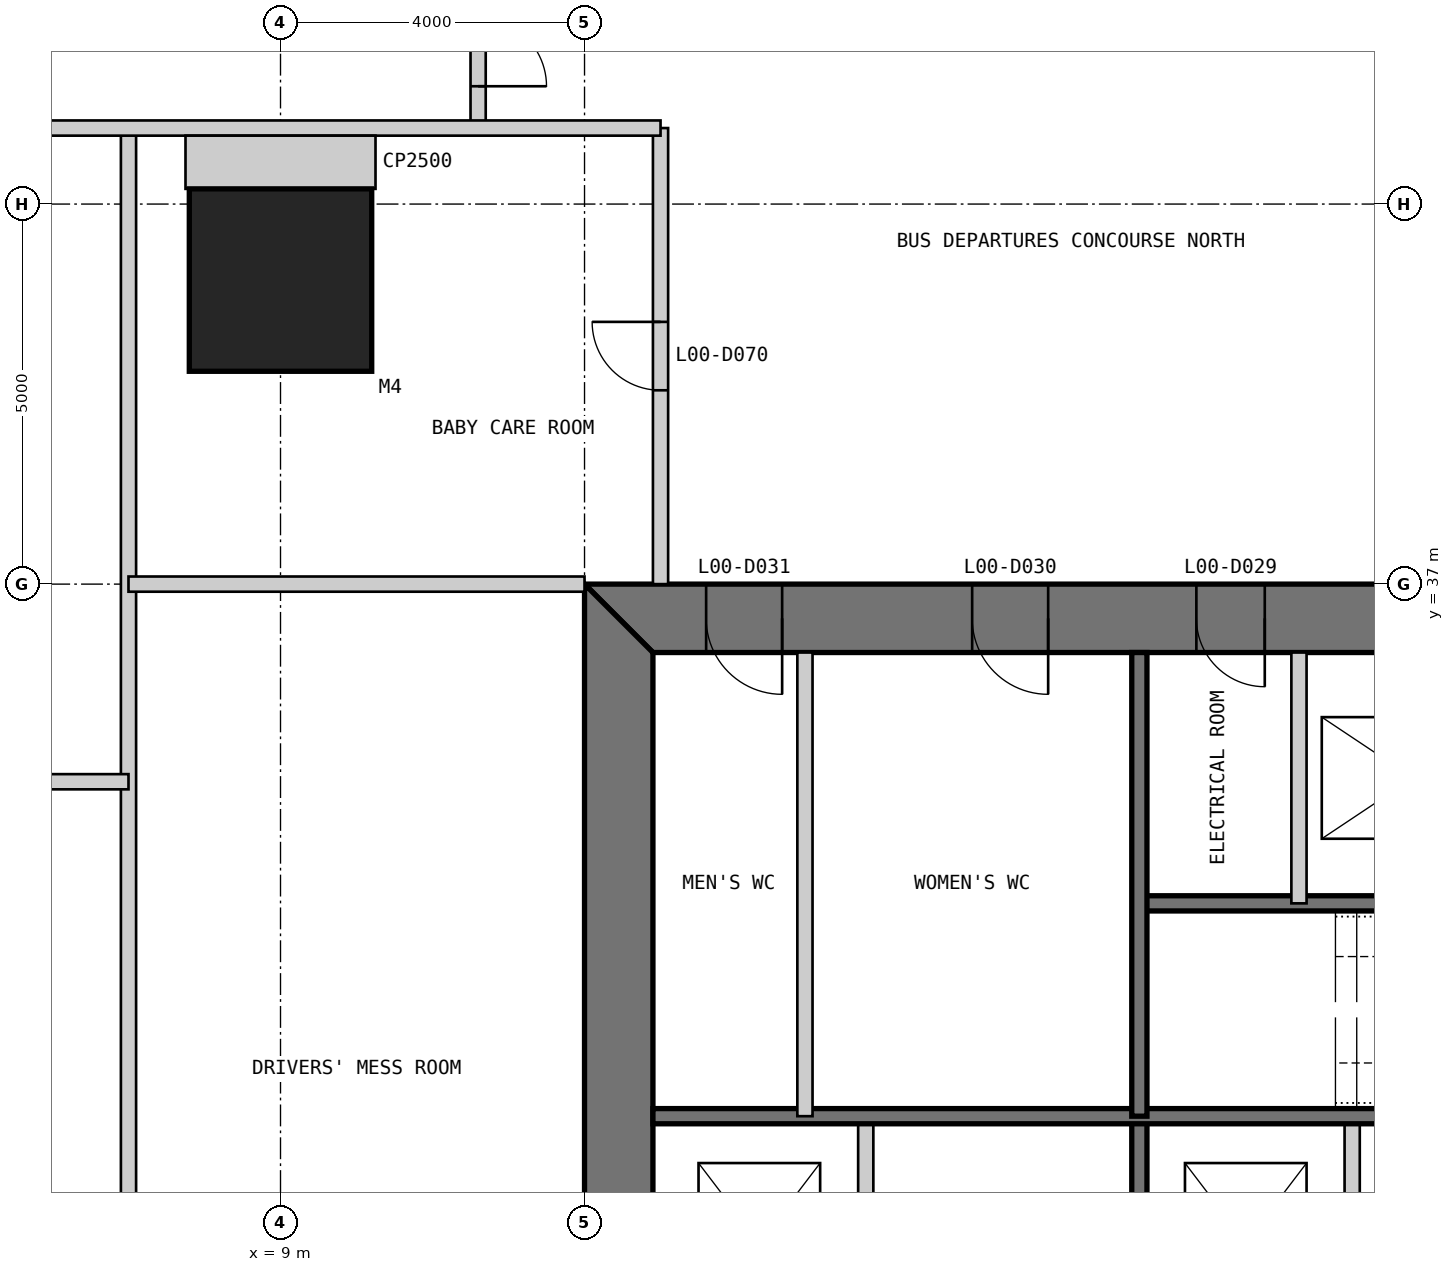
"""IFC4 building model, lengths in metres.
Left out: names, types, materials, properties, quantities, classifications, styles, units other than length and angle.
Written with IfcOpenShell. Run it as: python <this file> out.ifc"""

import sys

from ifc_helpers import new_model, si_unit, direction, frame, frame_2d, origin, origin_2d, place, context, subcontext, project, spatial, polyline, rectangle, outline, extrude, element, fill, save


model = new_model("IFC4")
c1 = context("Model", 3, precision=1e-05, world=origin(), true_north=direction((0.0, 1.0)))
c2 = subcontext(c1, "Body", "Model", "MODEL_VIEW")
j1 = project(units=[si_unit("LENGTHUNIT", "METRE"), si_unit("PLANEANGLEUNIT", "RADIAN")], contexts=[c1])
p1 = place(None, origin())
s1 = spatial("IfcSite", under=j1, at=p1, CompositionType="ELEMENT")
p2 = place(p1, origin())
s2 = spatial("IfcBuilding", under=s1, at=p2, CompositionType="ELEMENT")
p3 = place(p2, origin())
s3 = spatial("IfcBuildingStorey", under=s2, at=p3, CompositionType="ELEMENT", Elevation=0.0)
p4 = place(p3, frame((9.0, 41.0, 0.0), z_axis=(0.0, 0.0, 1.0), x_axis=(1.0, 0.0, 0.0)))
e1 = element("IfcColumn", 1, at=p4, inside=s3, PredefinedType="COLUMN", context=c2, shape_type="SweptSolid", body=[
    extrude(rectangle(XDim=2.4, YDim=2.4, at=origin_2d()), origin(), (0.0, 0.0, 1.0), 7.0),
])
p5 = place(p3, frame((37.0, 36.55, 0.0), z_axis=(0.0, 0.0, 1.0), x_axis=(-1.0, 0.0, 0.0)))
e2 = element("IfcWall", 2, at=p5, inside=s3, PredefinedType="SHEAR", context=c2, shape_type="SweptSolid", body=[
    extrude(outline(polyline([(0.0, -0.45), (24.0, -0.45), (23.1, 0.45), (0.9, 0.45), (0.0, -0.45)])), origin(), (0.0, 0.0, 1.0), 7.0),
])
p6 = place(p5, frame((4.9, 0.0, 0.0)))
e3 = element("IfcOpeningElement", 3, at=p6, cuts=e2, PredefinedType="OPENING", context=c2, shape_type="SweptSolid", body=[
    extrude(rectangle(XDim=1.0, YDim=2.2, at=frame_2d((0.5, 1.1))), frame((0.0, 0.46, 0.0), z_axis=(0.0, -1.0, 0.0), x_axis=(1.0, 0.0, 0.0)), (0.0, 0.0, 1.0), 0.92),
])
p7 = place(p5, frame((8.9, 0.0, 0.0)))
e4 = element("IfcOpeningElement", 4, at=p7, cuts=e2, PredefinedType="OPENING", context=c2, shape_type="SweptSolid", body=[
    extrude(rectangle(XDim=1.1, YDim=2.2, at=frame_2d((0.55, 1.1))), frame((0.0, 0.46, 0.0), z_axis=(0.0, -1.0, 0.0), x_axis=(1.0, 0.0, 0.0)), (0.0, 0.0, 1.0), 0.92),
])
p8 = place(p5, frame((15.05, 0.0, 0.0)))
e5 = element("IfcOpeningElement", 5, at=p8, cuts=e2, PredefinedType="OPENING", context=c2, shape_type="SweptSolid", body=[
    extrude(rectangle(XDim=0.9, YDim=2.2, at=frame_2d((0.45, 1.1))), frame((0.0, 0.46, 0.0), z_axis=(0.0, -1.0, 0.0), x_axis=(1.0, 0.0, 0.0)), (0.0, 0.0, 1.0), 0.92),
])
p9 = place(p5, frame((17.9, 0.0, 0.0)))
e6 = element("IfcOpeningElement", 6, at=p9, cuts=e2, PredefinedType="OPENING", context=c2, shape_type="SweptSolid", body=[
    extrude(rectangle(XDim=1.0, YDim=2.2, at=frame_2d((0.5, 1.1))), frame((0.0, 0.46, 0.0), z_axis=(0.0, -1.0, 0.0), x_axis=(1.0, 0.0, 0.0)), (0.0, 0.0, 1.0), 0.92),
])
p10 = place(p5, frame((21.4, 0.0, 0.0)))
e7 = element("IfcOpeningElement", 7, at=p10, cuts=e2, PredefinedType="OPENING", context=c2, shape_type="SweptSolid", body=[
    extrude(rectangle(XDim=1.0, YDim=2.2, at=frame_2d((0.5, 1.1))), frame((0.0, 0.46, 0.0), z_axis=(0.0, -1.0, 0.0), x_axis=(1.0, 0.0, 0.0)), (0.0, 0.0, 1.0), 0.92),
])
p11 = place(p3, frame((13.45, 36.1, 0.0), z_axis=(0.0, 0.0, 1.0), x_axis=(0.0, -1.0, 0.0)))
e8 = element("IfcWall", 8, at=p11, inside=s3, PredefinedType="SHEAR", context=c2, shape_type="SweptSolid", body=[
    extrude(outline(polyline([(-0.9, -0.45), (23.1, -0.45), (22.2, 0.45), (0.0, 0.45), (-0.9, -0.45)])), origin(), (0.0, 0.0, 1.0), 7.0),
])
p12 = place(p11, frame((20.2, 0.0, 0.0)))
e9 = element("IfcOpeningElement", 9, at=p12, cuts=e8, PredefinedType="OPENING", context=c2, shape_type="SweptSolid", body=[
    extrude(rectangle(XDim=1.0, YDim=2.2, at=frame_2d((0.5, 1.1))), frame((0.0, 0.46, 0.0), z_axis=(0.0, -1.0, 0.0), x_axis=(1.0, 0.0, 0.0)), (0.0, 0.0, 1.0), 0.92),
])
p13 = place(p11, frame((17.25, 0.0, 0.0)))
e10 = element("IfcOpeningElement", 10, at=p13, cuts=e8, PredefinedType="OPENING", context=c2, shape_type="SweptSolid", body=[
    extrude(rectangle(XDim=0.9, YDim=2.2, at=frame_2d((0.45, 1.1))), frame((0.0, 0.46, 0.0), z_axis=(0.0, -1.0, 0.0), x_axis=(1.0, 0.0, 0.0)), (0.0, 0.0, 1.0), 0.92),
])
p14 = place(p3, frame((16.7, 13.9, 0.0), z_axis=(0.0, 0.0, 1.0), x_axis=(0.0, 1.0, 0.0)))
e11 = element("IfcWall", 11, at=p14, inside=s3, PredefinedType="PARTITIONING", context=c2, shape_type="SweptSolid", body=[
    extrude(rectangle(XDim=16.1, YDim=0.2, at=frame_2d((8.05, 0.0))), origin(), (0.0, 0.0, 1.0), 6.8),
])
p15 = place(p14, frame((3.8, 0.0, 0.0)))
e12 = element("IfcOpeningElement", 12, at=p15, cuts=e11, PredefinedType="OPENING", context=c2, shape_type="SweptSolid", body=[
    extrude(rectangle(XDim=0.9, YDim=2.2, at=frame_2d((0.45, 1.1))), frame((0.0, 0.11, 0.0), z_axis=(0.0, -1.0, 0.0), x_axis=(1.0, 0.0, 0.0)), (0.0, 0.0, 1.0), 0.22),
])
p16 = place(p14, frame((7.217, 0.0, 0.0)))
e13 = element("IfcOpeningElement", 13, at=p16, cuts=e11, PredefinedType="OPENING", context=c2, shape_type="SweptSolid", body=[
    extrude(rectangle(XDim=1.1, YDim=2.2, at=frame_2d((0.55, 1.1))), frame((0.0, 0.11, 0.0), z_axis=(0.0, -1.0, 0.0), x_axis=(1.0, 0.0, 0.0)), (0.0, 0.0, 1.0), 0.22),
])
p17 = place(p14, frame((10.55, 0.0, 0.0)))
e14 = element("IfcOpeningElement", 14, at=p17, cuts=e11, PredefinedType="OPENING", context=c2, shape_type="SweptSolid", body=[
    extrude(rectangle(XDim=1.1, YDim=2.2, at=frame_2d((0.55, 1.1))), frame((0.0, 0.11, 0.0), z_axis=(0.0, -1.0, 0.0), x_axis=(1.0, 0.0, 0.0)), (0.0, 0.0, 1.0), 0.22),
])
p18 = place(p14, frame((13.883, 0.0, 0.0)))
e15 = element("IfcOpeningElement", 15, at=p18, cuts=e11, PredefinedType="OPENING", context=c2, shape_type="SweptSolid", body=[
    extrude(rectangle(XDim=1.1, YDim=2.2, at=frame_2d((0.55, 1.1))), frame((0.0, 0.11, 0.0), z_axis=(0.0, -1.0, 0.0), x_axis=(1.0, 0.0, 0.0)), (0.0, 0.0, 1.0), 0.22),
])
p19 = place(p3, frame((20.3, 13.9, 0.0), z_axis=(0.0, 0.0, 1.0), x_axis=(0.0, 1.0, 0.0)))
e16 = element("IfcWall", 16, at=p19, inside=s3, PredefinedType="SOLIDWALL", context=c2, shape_type="SweptSolid", body=[
    extrude(rectangle(XDim=16.1, YDim=0.2, at=frame_2d((8.05, 0.0))), origin(), (0.0, 0.0, 1.0), 6.8),
])
p20 = place(p19, frame((7.217, 0.0, 0.0)))
e17 = element("IfcOpeningElement", 17, at=p20, cuts=e16, PredefinedType="OPENING", context=c2, shape_type="SweptSolid", body=[
    extrude(rectangle(XDim=1.1, YDim=2.2, at=frame_2d((0.55, 1.1))), frame((0.0, 0.11, 0.0), z_axis=(0.0, -1.0, 0.0), x_axis=(1.0, 0.0, 0.0)), (0.0, 0.0, 1.0), 0.22),
])
p21 = place(p19, frame((10.55, 0.0, 0.0)))
e18 = element("IfcOpeningElement", 18, at=p21, cuts=e16, PredefinedType="OPENING", context=c2, shape_type="SweptSolid", body=[
    extrude(rectangle(XDim=1.1, YDim=2.2, at=frame_2d((0.55, 1.1))), frame((0.0, 0.11, 0.0), z_axis=(0.0, -1.0, 0.0), x_axis=(1.0, 0.0, 0.0)), (0.0, 0.0, 1.0), 0.22),
])
p22 = place(p19, frame((13.883, 0.0, 0.0)))
e19 = element("IfcOpeningElement", 19, at=p22, cuts=e16, PredefinedType="OPENING", context=c2, shape_type="SweptSolid", body=[
    extrude(rectangle(XDim=1.1, YDim=2.2, at=frame_2d((0.55, 1.1))), frame((0.0, 0.11, 0.0), z_axis=(0.0, -1.0, 0.0), x_axis=(1.0, 0.0, 0.0)), (0.0, 0.0, 1.0), 0.22),
])
p23 = place(p3, frame((23.1, 20.0, 0.0), z_axis=(0.0, 0.0, 1.0), x_axis=(0.0, 1.0, 0.0)))
e20 = element("IfcWall", 20, at=p23, inside=s3, PredefinedType="PARTITIONING", context=c2, shape_type="SweptSolid", body=[
    extrude(rectangle(XDim=10.0, YDim=0.2, at=frame_2d((5.0, 0.0))), origin(), (0.0, 0.0, 1.0), 6.8),
])
p24 = place(p3, frame((29.7, 32.8, 0.0), z_axis=(0.0, 0.0, 1.0), x_axis=(-1.0, 0.0, 0.0)))
e21 = element("IfcWall", 21, at=p24, inside=s3, PredefinedType="SOLIDWALL", context=c2, shape_type="SweptSolid", body=[
    extrude(rectangle(XDim=9.4, YDim=0.2, at=frame_2d((4.7, 0.0))), origin(), (0.0, 0.0, 1.0), 6.8),
])
p25 = place(p24, frame((0.25, 0.0, 0.0)))
e22 = element("IfcOpeningElement", 22, at=p25, cuts=e21, PredefinedType="OPENING", context=c2, shape_type="SweptSolid", body=[
    extrude(rectangle(XDim=1.0, YDim=2.2, at=frame_2d((0.5, 1.1))), frame((0.0, 0.11, 0.0), z_axis=(0.0, -1.0, 0.0), x_axis=(1.0, 0.0, 0.0)), (0.0, 0.0, 1.0), 0.22),
])
p26 = place(p3, frame((29.7, 30.0, 0.0), z_axis=(0.0, 0.0, 1.0), x_axis=(-1.0, 0.0, 0.0)))
e23 = element("IfcWall", 23, at=p26, inside=s3, PredefinedType="SOLIDWALL", context=c2, shape_type="SweptSolid", body=[
    extrude(rectangle(XDim=15.8, YDim=0.2, at=frame_2d((7.9, 0.0))), origin(), (0.0, 0.0, 1.0), 6.8),
])
p27 = place(p3, frame((22.4, 36.1, 0.0), z_axis=(0.0, 0.0, 1.0), x_axis=(0.0, -1.0, 0.0)))
e24 = element("IfcWall", 24, at=p27, inside=s3, PredefinedType="PARTITIONING", context=c2, shape_type="SweptSolid", body=[
    extrude(rectangle(XDim=3.3, YDim=0.2, at=frame_2d((1.65, 0.0))), origin(), (0.0, 0.0, 1.0), 6.8),
])
p28 = place(p3, frame((20.3, 36.1, 0.0), z_axis=(0.0, 0.0, 1.0), x_axis=(0.0, -1.0, 0.0)))
e25 = element("IfcWall", 25, at=p28, inside=s3, PredefinedType="SOLIDWALL", context=c2, shape_type="SweptSolid", body=[
    extrude(rectangle(XDim=6.1, YDim=0.2, at=frame_2d((3.05, 0.0))), origin(), (0.0, 0.0, 1.0), 6.8),
])
p29 = place(p3, frame((15.9, 36.1, 0.0), z_axis=(0.0, 0.0, 1.0), x_axis=(0.0, -1.0, 0.0)))
e26 = element("IfcWall", 26, at=p29, inside=s3, PredefinedType="PARTITIONING", context=c2, shape_type="SweptSolid", body=[
    extrude(rectangle(XDim=6.1, YDim=0.2, at=frame_2d((3.05, 0.0))), origin(), (0.0, 0.0, 1.0), 6.8),
])
p30 = place(p3, frame((7.0, 22.0, 0.0), z_axis=(0.0, 0.0, 1.0), x_axis=(0.0, 1.0, 0.0)))
e27 = element("IfcWall", 27, at=p30, inside=s3, PredefinedType="PARTITIONING", context=c2, shape_type="SweptSolid", body=[
    extrude(rectangle(XDim=21.0, YDim=0.2, at=frame_2d((10.5, 0.0))), origin(), (0.0, 0.0, 1.0), 6.043),
])
p31 = place(p30, frame((4.05, 0.0, 0.0)))
e28 = element("IfcOpeningElement", 28, at=p31, cuts=e27, PredefinedType="OPENING", context=c2, shape_type="SweptSolid", body=[
    extrude(rectangle(XDim=1.8, YDim=2.4, at=frame_2d((0.9, 1.2))), frame((0.0, 0.11, 0.0), z_axis=(0.0, -1.0, 0.0), x_axis=(1.0, 0.0, 0.0)), (0.0, 0.0, 1.0), 0.22),
])
p32 = place(p3, frame((11.6, 43.0, 0.0), z_axis=(0.0, 0.0, 1.0), x_axis=(0.0, 1.0, 0.0)))
e29 = element("IfcWall", 29, at=p32, inside=s3, PredefinedType="PARTITIONING", context=c2, shape_type="SweptSolid", body=[
    extrude(rectangle(XDim=22.25, YDim=0.2, at=frame_2d((11.125, 0.0))), origin(), (0.0, 0.0, 1.0), 6.7),
])
p33 = place(p32, frame((7.175, 0.0, 0.0)))
e30 = element("IfcOpeningElement", 30, at=p33, cuts=e29, PredefinedType="OPENING", context=c2, shape_type="SweptSolid", body=[
    extrude(rectangle(XDim=1.8, YDim=2.4, at=frame_2d((0.9, 1.2))), frame((0.0, 0.11, 0.0), z_axis=(0.0, -1.0, 0.0), x_axis=(1.0, 0.0, 0.0)), (0.0, 0.0, 1.0), 0.22),
])
p34 = place(p32, frame((0.55, 0.0, 0.0)))
e31 = element("IfcOpeningElement", 31, at=p34, cuts=e29, PredefinedType="OPENING", context=c2, shape_type="SweptSolid", body=[
    extrude(rectangle(XDim=1.8, YDim=2.4, at=frame_2d((0.9, 1.2))), frame((0.0, 0.11, 0.0), z_axis=(0.0, -1.0, 0.0), x_axis=(1.0, 0.0, 0.0)), (0.0, 0.0, 1.0), 0.22),
])
p35 = place(p32, frame((17.5, 0.0, 0.0)))
e32 = element("IfcOpeningElement", 32, at=p35, cuts=e29, PredefinedType="OPENING", context=c2, shape_type="SweptSolid", body=[
    extrude(rectangle(XDim=1.8, YDim=2.4, at=frame_2d((0.9, 1.2))), frame((0.0, 0.11, 0.0), z_axis=(0.0, -1.0, 0.0), x_axis=(1.0, 0.0, 0.0)), (0.0, 0.0, 1.0), 0.22),
])
p36 = place(p3, frame((14.0, 37.0, 0.0), z_axis=(0.0, 0.0, 1.0), x_axis=(0.0, 1.0, 0.0)))
e33 = element("IfcWall", 33, at=p36, inside=s3, PredefinedType="PARTITIONING", context=c2, shape_type="SweptSolid", body=[
    extrude(rectangle(XDim=6.0, YDim=0.2, at=frame_2d((3.0, 0.0))), origin(), (0.0, 0.0, 1.0), 6.7),
])
p37 = place(p36, frame((2.55, 0.0, 0.0)))
e34 = element("IfcOpeningElement", 34, at=p37, cuts=e33, PredefinedType="OPENING", context=c2, shape_type="SweptSolid", body=[
    extrude(rectangle(XDim=0.9, YDim=2.2, at=frame_2d((0.45, 1.1))), frame((0.0, 0.11, 0.0), z_axis=(0.0, -1.0, 0.0), x_axis=(1.0, 0.0, 0.0)), (0.0, 0.0, 1.0), 0.22),
])
p38 = place(p3, frame((-15.25, 34.4, 0.0), z_axis=(0.0, 0.0, 1.0), x_axis=(1.0, 0.0, 0.0)))
e35 = element("IfcWall", 35, at=p38, inside=s3, PredefinedType="PARTITIONING", context=c2, shape_type="SweptSolid", body=[
    extrude(rectangle(XDim=22.25, YDim=0.2, at=frame_2d((11.125, 0.0))), origin(), (0.0, 0.0, 1.0), 6.7),
])
p39 = place(p38, frame((17.525, 0.0, 0.0)))
e36 = element("IfcOpeningElement", 36, at=p39, cuts=e35, PredefinedType="OPENING", context=c2, shape_type="SweptSolid", body=[
    extrude(rectangle(XDim=1.8, YDim=2.4, at=frame_2d((0.9, 1.2))), frame((0.0, 0.11, 0.0), z_axis=(0.0, -1.0, 0.0), x_axis=(1.0, 0.0, 0.0)), (0.0, 0.0, 1.0), 0.22),
])
p40 = place(p38, frame((10.325, 0.0, 0.0)))
e37 = element("IfcOpeningElement", 37, at=p40, cuts=e35, PredefinedType="OPENING", context=c2, shape_type="SweptSolid", body=[
    extrude(rectangle(XDim=1.8, YDim=2.4, at=frame_2d((0.9, 1.2))), frame((0.0, 0.11, 0.0), z_axis=(0.0, -1.0, 0.0), x_axis=(1.0, 0.0, 0.0)), (0.0, 0.0, 1.0), 0.22),
])
p41 = place(p38, frame((3.025, 0.0, 0.0)))
e38 = element("IfcOpeningElement", 38, at=p41, cuts=e35, PredefinedType="OPENING", context=c2, shape_type="SweptSolid", body=[
    extrude(rectangle(XDim=1.8, YDim=2.4, at=frame_2d((0.9, 1.2))), frame((0.0, 0.11, 0.0), z_axis=(0.0, -1.0, 0.0), x_axis=(1.0, 0.0, 0.0)), (0.0, 0.0, 1.0), 0.22),
])
p42 = place(p3, frame((7.0, 37.0, 0.0), z_axis=(0.0, 0.0, 1.0), x_axis=(1.0, 0.0, 0.0)))
e39 = element("IfcWall", 39, at=p42, inside=s3, PredefinedType="PARTITIONING", context=c2, shape_type="SweptSolid", body=[
    extrude(rectangle(XDim=6.0, YDim=0.2, at=frame_2d((3.0, 0.0))), origin(), (0.0, 0.0, 1.0), 5.853),
])
p43 = place(p3, frame((-0.6, 43.0, 0.0), z_axis=(0.0, 0.0, 1.0), x_axis=(1.0, 0.0, 0.0)))
e40 = element("IfcWall", 40, at=p43, inside=s3, PredefinedType="PARTITIONING", context=c2, shape_type="SweptSolid", body=[
    extrude(rectangle(XDim=14.6, YDim=0.2, at=frame_2d((7.3, 0.0))), origin(), (0.0, 0.0, 1.0), 6.7),
])
p44 = place(p3, frame((9.0, 42.9, 0.0), z_axis=(0.0, 0.0, 1.0), x_axis=(0.0, -1.0, 0.0)))
e41 = element("IfcWall", 41, at=p44, inside=s3, PredefinedType="PARTITIONING", context=c2, shape_type="SweptSolid", body=[
    extrude(rectangle(XDim=0.7, YDim=2.5, at=frame_2d((0.35, 0.0))), origin(), (0.0, 0.0, 1.0), 6.7),
])
p45 = place(p8, origin())
e42 = element("IfcDoor", 42, at=p45, inside=s3, OperationType="SINGLE_SWING_LEFT", PredefinedType="DOOR", context=c2, shape_type="SweptSolid", body=[
    extrude(rectangle(XDim=0.9, YDim=2.2, at=frame_2d((0.45, 1.1))), frame((0.0, 0.025, 0.0), z_axis=(0.0, -1.0, 0.0), x_axis=(1.0, 0.0, 0.0)), (0.0, 0.0, 1.0), 0.05),
    extrude(outline(polyline([(0.0, 0.0), (0.04, 0.0), (0.04, 2.16), (0.86, 2.16), (0.86, 0.0), (0.9, 0.0), (0.9, 2.2), (0.0, 2.2), (0.0, 0.0)])), frame((0.0, 0.3, 0.0), z_axis=(0.0, -1.0, 0.0), x_axis=(1.0, 0.0, 0.0)), (0.0, 0.0, 1.0), 0.6),
])
fill(e5, e42)
p46 = place(p9, origin())
e43 = element("IfcDoor", 43, at=p46, inside=s3, OperationType="SINGLE_SWING_LEFT", PredefinedType="DOOR", context=c2, shape_type="SweptSolid", body=[
    extrude(rectangle(XDim=1.0, YDim=2.2, at=frame_2d((0.5, 1.1))), frame((0.0, 0.025, 0.0), z_axis=(0.0, -1.0, 0.0), x_axis=(1.0, 0.0, 0.0)), (0.0, 0.0, 1.0), 0.05),
    extrude(outline(polyline([(0.0, 0.0), (0.04, 0.0), (0.04, 2.16), (0.96, 2.16), (0.96, 0.0), (1.0, 0.0), (1.0, 2.2), (0.0, 2.2), (0.0, 0.0)])), frame((0.0, 0.3, 0.0), z_axis=(0.0, -1.0, 0.0), x_axis=(1.0, 0.0, 0.0)), (0.0, 0.0, 1.0), 0.6),
])
fill(e6, e43)
p47 = place(p10, origin())
e44 = element("IfcDoor", 44, at=p47, inside=s3, OperationType="SINGLE_SWING_LEFT", PredefinedType="DOOR", context=c2, shape_type="SweptSolid", body=[
    extrude(rectangle(XDim=1.0, YDim=2.2, at=frame_2d((0.5, 1.1))), frame((0.0, 0.025, 0.0), z_axis=(0.0, -1.0, 0.0), x_axis=(1.0, 0.0, 0.0)), (0.0, 0.0, 1.0), 0.05),
    extrude(outline(polyline([(0.0, 0.0), (0.04, 0.0), (0.04, 2.16), (0.96, 2.16), (0.96, 0.0), (1.0, 0.0), (1.0, 2.2), (0.0, 2.2), (0.0, 0.0)])), frame((0.0, 0.3, 0.0), z_axis=(0.0, -1.0, 0.0), x_axis=(1.0, 0.0, 0.0)), (0.0, 0.0, 1.0), 0.6),
])
fill(e7, e44)
p48 = place(p34, frame((1.8, 0.0, 0.0), z_axis=(0.0, 0.0, 1.0), x_axis=(-1.0, 0.0, 0.0)))
e45 = element("IfcDoor", 45, at=p48, inside=s3, OperationType="DOUBLE_DOOR_SINGLE_SWING", PredefinedType="DOOR", context=c2, shape_type="SweptSolid", body=[
    extrude(rectangle(XDim=1.8, YDim=2.4, at=frame_2d((0.9, 1.2))), frame((0.0, 0.025, 0.0), z_axis=(0.0, -1.0, 0.0), x_axis=(1.0, 0.0, 0.0)), (0.0, 0.0, 1.0), 0.05),
])
fill(e31, e45)
p49 = place(p37, origin())
e46 = element("IfcDoor", 46, at=p49, inside=s3, OperationType="SINGLE_SWING_RIGHT", PredefinedType="DOOR", context=c2, shape_type="SweptSolid", body=[
    extrude(rectangle(XDim=0.9, YDim=2.2, at=frame_2d((0.45, 1.1))), frame((0.0, 0.025, 0.0), z_axis=(0.0, -1.0, 0.0), x_axis=(1.0, 0.0, 0.0)), (0.0, 0.0, 1.0), 0.05),
])
fill(e34, e46)
save(model, sys.argv[1])
